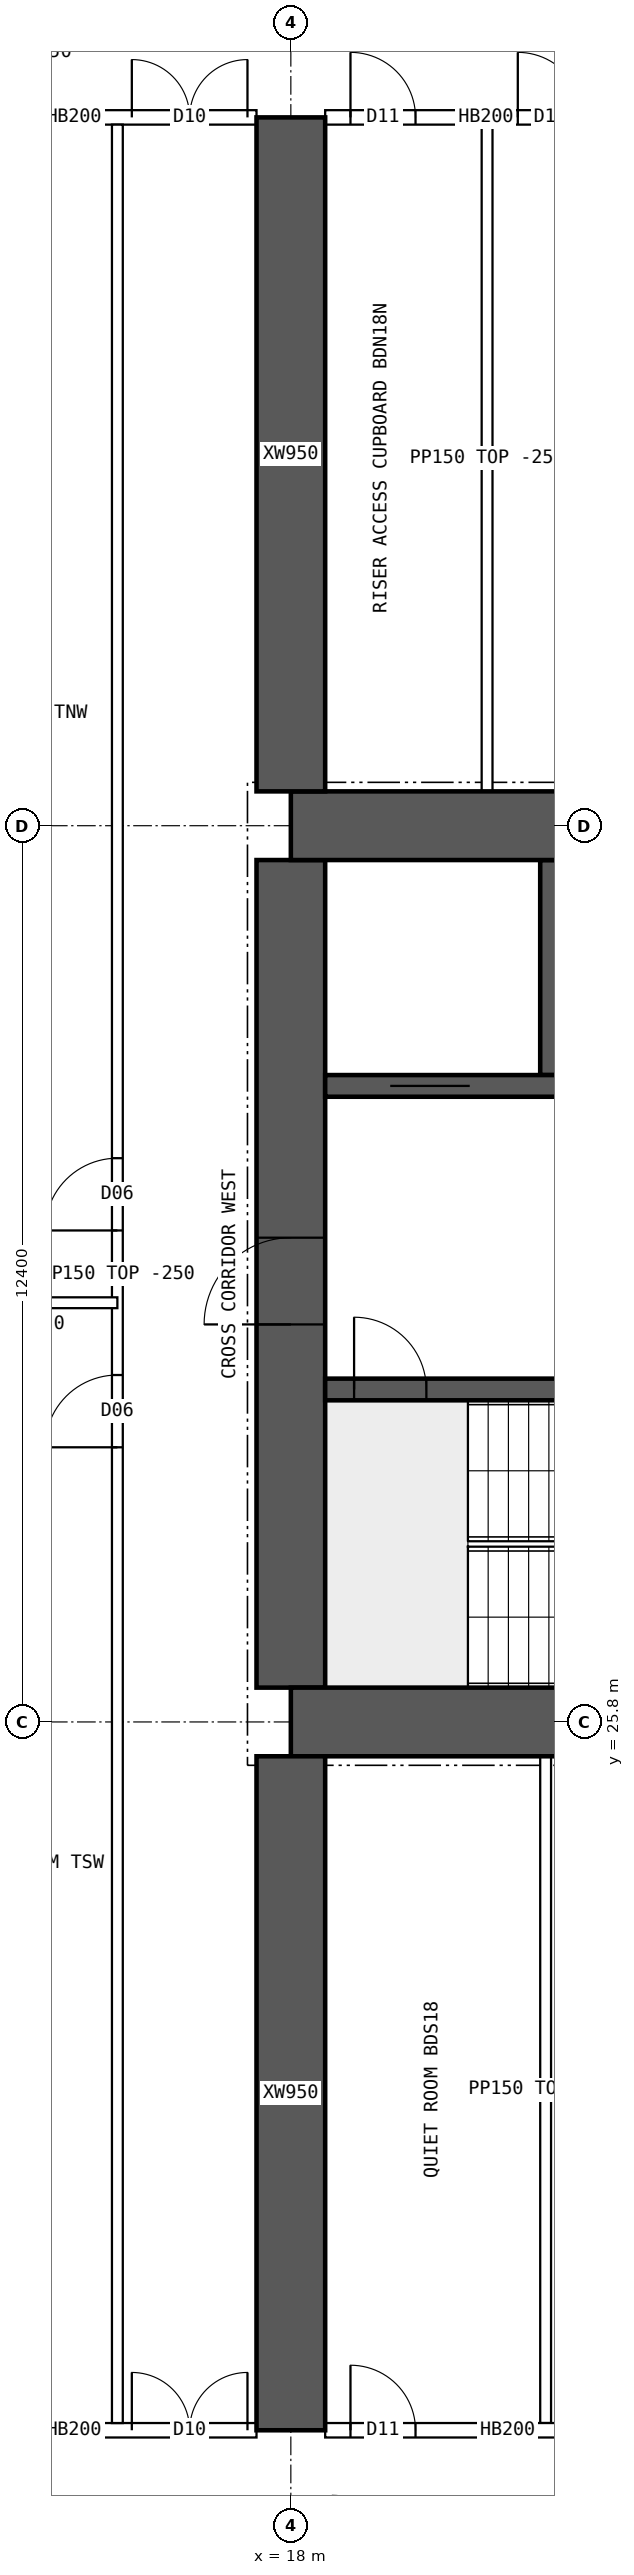
"""IFC4 building model, lengths in metres.
Left out: names, types, materials, properties, quantities, classifications, styles, units other than length and angle.
Written with IfcOpenShell. Run it as: python <this file> out.ifc"""

import sys

from ifc_helpers import new_model, si_unit, direction, frame, frame_2d, origin, place, context, subcontext, project, spatial, rectangle, extrude, element, fill, save


model = new_model("IFC4")
c1 = context("Model", 3, precision=1e-05, world=origin(), true_north=direction((0.0, 1.0)))
c2 = subcontext(c1, "Body", "Model", "MODEL_VIEW")
j1 = project(units=[si_unit("LENGTHUNIT", "METRE"), si_unit("PLANEANGLEUNIT", "RADIAN")], contexts=[c1])
p1 = place(None, origin())
s1 = spatial("IfcSite", under=j1, at=p1, CompositionType="ELEMENT")
p2 = place(p1, origin())
s2 = spatial("IfcBuilding", under=s1, at=p2, CompositionType="ELEMENT")
p3 = place(p2, frame((0.0, 0.0, 91.9)))
s3 = spatial("IfcBuildingStorey", under=s2, at=p3, CompositionType="ELEMENT", Elevation=91.9)
for number, where, z_axis, x_axis in (
    (1, (18.0, 25.8, 0.0), (0.0, 0.0, 1.0), (1.0, 0.0, 0.0)),
    (2, (18.0, 38.2, 0.0), (0.0, 0.0, 1.0), (1.0, 0.0, 0.0)),
):
    element("IfcWall", number, at=place(p3, frame(where, z_axis=z_axis, x_axis=x_axis)), inside=s3, PredefinedType="SHEAR", context=c2, shape_type="SweptSolid", body=[
        extrude(rectangle(XDim=48.0, YDim=0.95, at=frame_2d((24.0, 0.0))), origin(), (0.0, 0.0, 1.0), 3.75),
    ])
p4 = place(p3, frame((18.0, 26.275, 0.0), z_axis=(0.0, 0.0, 1.0), x_axis=(0.0, 1.0, 0.0)))
e3 = element("IfcWall", 3, at=p4, inside=s3, PredefinedType="SHEAR", context=c2, shape_type="SweptSolid", body=[
    extrude(rectangle(XDim=11.45, YDim=0.95, at=frame_2d((5.725, 0.0))), origin(), (0.0, 0.0, 1.0), 3.75),
])
p5 = place(p4, frame((5.025, 0.0, 0.0)))
e4 = element("IfcOpeningElement", 4, at=p5, cuts=e3, PredefinedType="OPENING", context=c2, shape_type="SweptSolid", body=[
    extrude(rectangle(XDim=1.2, YDim=2.1, at=frame_2d((0.6, 1.05))), frame((0.0, 0.485, 0.0), z_axis=(0.0, -1.0, 0.0), x_axis=(1.0, 0.0, 0.0)), (0.0, 0.0, 1.0), 0.97),
])
p6 = place(p3, frame((18.475, 30.4, 0.0), z_axis=(0.0, 0.0, 1.0), x_axis=(1.0, 0.0, 0.0)))
e5 = element("IfcWall", 5, at=p6, inside=s3, PredefinedType="SHEAR", context=c2, shape_type="SweptSolid", body=[
    extrude(rectangle(XDim=47.05, YDim=0.3, at=frame_2d((23.525, 0.0))), origin(), (0.0, 0.0, 1.0), 3.75),
])
p7 = place(p6, frame((0.4, 0.0, 0.0)))
e6 = element("IfcOpeningElement", 6, at=p7, cuts=e5, PredefinedType="OPENING", context=c2, shape_type="SweptSolid", body=[
    extrude(rectangle(XDim=1.0, YDim=2.1, at=frame_2d((0.5, 1.05))), frame((0.0, 0.16, 0.0), z_axis=(0.0, -1.0, 0.0), x_axis=(1.0, 0.0, 0.0)), (0.0, 0.0, 1.0), 0.32),
])
p8 = place(p6, frame((45.65, 0.0, 0.0)))
e7 = element("IfcOpeningElement", 7, at=p8, cuts=e5, PredefinedType="OPENING", context=c2, shape_type="SweptSolid", body=[
    extrude(rectangle(XDim=1.0, YDim=2.1, at=frame_2d((0.5, 1.05))), frame((0.0, 0.16, 0.0), z_axis=(0.0, -1.0, 0.0), x_axis=(1.0, 0.0, 0.0)), (0.0, 0.0, 1.0), 0.32),
])
p9 = place(p6, frame((8.275, 0.0, 0.0)))
e8 = element("IfcOpeningElement", 8, at=p9, cuts=e5, PredefinedType="OPENING", context=c2, shape_type="SweptSolid", body=[
    extrude(rectangle(XDim=1.1, YDim=2.1, at=frame_2d((0.55, 1.05))), frame((0.0, 0.16, 0.0), z_axis=(0.0, -1.0, 0.0), x_axis=(1.0, 0.0, 0.0)), (0.0, 0.0, 1.0), 0.32),
])
p10 = place(p6, frame((10.875, 0.0, 0.0)))
e9 = element("IfcOpeningElement", 9, at=p10, cuts=e5, PredefinedType="OPENING", context=c2, shape_type="SweptSolid", body=[
    extrude(rectangle(XDim=1.1, YDim=2.1, at=frame_2d((0.55, 1.05))), frame((0.0, 0.16, 0.0), z_axis=(0.0, -1.0, 0.0), x_axis=(1.0, 0.0, 0.0)), (0.0, 0.0, 1.0), 0.32),
])
p11 = place(p6, frame((13.475, 0.0, 0.0)))
e10 = element("IfcOpeningElement", 10, at=p11, cuts=e5, PredefinedType="OPENING", context=c2, shape_type="SweptSolid", body=[
    extrude(rectangle(XDim=1.1, YDim=2.1, at=frame_2d((0.55, 1.05))), frame((0.0, 0.16, 0.0), z_axis=(0.0, -1.0, 0.0), x_axis=(1.0, 0.0, 0.0)), (0.0, 0.0, 1.0), 0.32),
])
p12 = place(p6, frame((16.075, 0.0, 0.0)))
e11 = element("IfcOpeningElement", 11, at=p12, cuts=e5, PredefinedType="OPENING", context=c2, shape_type="SweptSolid", body=[
    extrude(rectangle(XDim=1.1, YDim=2.1, at=frame_2d((0.55, 1.05))), frame((0.0, 0.16, 0.0), z_axis=(0.0, -1.0, 0.0), x_axis=(1.0, 0.0, 0.0)), (0.0, 0.0, 1.0), 0.32),
])
p13 = place(p6, frame((18.85, 0.0, 0.0)))
e12 = element("IfcOpeningElement", 12, at=p13, cuts=e5, PredefinedType="OPENING", context=c2, shape_type="SweptSolid", body=[
    extrude(rectangle(XDim=0.9, YDim=2.1, at=frame_2d((0.45, 1.05))), frame((0.0, 0.16, 0.0), z_axis=(0.0, -1.0, 0.0), x_axis=(1.0, 0.0, 0.0)), (0.0, 0.0, 1.0), 0.32),
])
p14 = place(p6, frame((30.142, 0.0, 0.0)))
e13 = element("IfcOpeningElement", 13, at=p14, cuts=e5, PredefinedType="OPENING", context=c2, shape_type="SweptSolid", body=[
    extrude(rectangle(XDim=1.1, YDim=2.1, at=frame_2d((0.55, 1.05))), frame((0.0, 0.16, 0.0), z_axis=(0.0, -1.0, 0.0), x_axis=(1.0, 0.0, 0.0)), (0.0, 0.0, 1.0), 0.32),
])
p15 = place(p6, frame((33.675, 0.0, 0.0)))
e14 = element("IfcOpeningElement", 14, at=p15, cuts=e5, PredefinedType="OPENING", context=c2, shape_type="SweptSolid", body=[
    extrude(rectangle(XDim=1.1, YDim=2.1, at=frame_2d((0.55, 1.05))), frame((0.0, 0.16, 0.0), z_axis=(0.0, -1.0, 0.0), x_axis=(1.0, 0.0, 0.0)), (0.0, 0.0, 1.0), 0.32),
])
p16 = place(p6, frame((37.208, 0.0, 0.0)))
e15 = element("IfcOpeningElement", 15, at=p16, cuts=e5, PredefinedType="OPENING", context=c2, shape_type="SweptSolid", body=[
    extrude(rectangle(XDim=1.1, YDim=2.1, at=frame_2d((0.55, 1.05))), frame((0.0, 0.16, 0.0), z_axis=(0.0, -1.0, 0.0), x_axis=(1.0, 0.0, 0.0)), (0.0, 0.0, 1.0), 0.32),
])
p17 = place(p3, frame((18.475, 34.6, 0.0), z_axis=(0.0, 0.0, 1.0), x_axis=(1.0, 0.0, 0.0)))
e16 = element("IfcWall", 16, at=p17, inside=s3, PredefinedType="SHEAR", context=c2, shape_type="SweptSolid", body=[
    extrude(rectangle(XDim=47.05, YDim=0.3, at=frame_2d((23.525, 0.0))), origin(), (0.0, 0.0, 1.0), 3.75),
])
p18 = place(p17, frame((0.9, 0.0, 0.0)))
e17 = element("IfcOpeningElement", 17, at=p18, cuts=e16, PredefinedType="OPENING", context=c2, shape_type="SweptSolid", body=[
    extrude(rectangle(XDim=1.1, YDim=2.1, at=frame_2d((0.55, 1.05))), frame((0.0, 0.16, 0.0), z_axis=(0.0, -1.0, 0.0), x_axis=(1.0, 0.0, 0.0)), (0.0, 0.0, 1.0), 0.32),
])
p19 = place(p17, frame((45.05, 0.0, 0.0)))
e18 = element("IfcOpeningElement", 18, at=p19, cuts=e16, PredefinedType="OPENING", context=c2, shape_type="SweptSolid", body=[
    extrude(rectangle(XDim=1.1, YDim=2.1, at=frame_2d((0.55, 1.05))), frame((0.0, 0.16, 0.0), z_axis=(0.0, -1.0, 0.0), x_axis=(1.0, 0.0, 0.0)), (0.0, 0.0, 1.0), 0.32),
])
p20 = place(p17, frame((4.125, 0.0, 0.0)))
e19 = element("IfcOpeningElement", 19, at=p20, cuts=e16, PredefinedType="OPENING", context=c2, shape_type="SweptSolid", body=[
    extrude(rectangle(XDim=0.9, YDim=2.1, at=frame_2d((0.45, 1.05))), frame((0.0, 0.16, 0.0), z_axis=(0.0, -1.0, 0.0), x_axis=(1.0, 0.0, 0.0)), (0.0, 0.0, 1.0), 0.32),
])
p21 = place(p17, frame((42.025, 0.0, 0.0)))
e20 = element("IfcOpeningElement", 20, at=p21, cuts=e16, PredefinedType="OPENING", context=c2, shape_type="SweptSolid", body=[
    extrude(rectangle(XDim=0.9, YDim=2.1, at=frame_2d((0.45, 1.05))), frame((0.0, 0.16, 0.0), z_axis=(0.0, -1.0, 0.0), x_axis=(1.0, 0.0, 0.0)), (0.0, 0.0, 1.0), 0.32),
])
p22 = place(p17, frame((8.9, 0.0, 0.0)))
e21 = element("IfcOpeningElement", 21, at=p22, cuts=e16, PredefinedType="OPENING", context=c2, shape_type="SweptSolid", body=[
    extrude(rectangle(XDim=0.9, YDim=2.1, at=frame_2d((0.45, 1.05))), frame((0.0, 0.16, 0.0), z_axis=(0.0, -1.0, 0.0), x_axis=(1.0, 0.0, 0.0)), (0.0, 0.0, 1.0), 0.32),
])
p23 = place(p17, frame((12.874, 0.0, 0.0)))
e22 = element("IfcOpeningElement", 22, at=p23, cuts=e16, PredefinedType="OPENING", context=c2, shape_type="SweptSolid", body=[
    extrude(rectangle(XDim=0.9, YDim=2.1, at=frame_2d((0.45, 1.05))), frame((0.0, 0.16, 0.0), z_axis=(0.0, -1.0, 0.0), x_axis=(1.0, 0.0, 0.0)), (0.0, 0.0, 1.0), 0.32),
])
p24 = place(p17, frame((16.521, 0.0, 0.0)))
e23 = element("IfcOpeningElement", 23, at=p24, cuts=e16, PredefinedType="OPENING", context=c2, shape_type="SweptSolid", body=[
    extrude(rectangle(XDim=0.9, YDim=2.1, at=frame_2d((0.45, 1.05))), frame((0.0, 0.16, 0.0), z_axis=(0.0, -1.0, 0.0), x_axis=(1.0, 0.0, 0.0)), (0.0, 0.0, 1.0), 0.32),
])
p25 = place(p17, frame((20.28, 0.0, 0.0)))
e24 = element("IfcOpeningElement", 24, at=p25, cuts=e16, PredefinedType="OPENING", context=c2, shape_type="SweptSolid", body=[
    extrude(rectangle(XDim=0.9, YDim=2.1, at=frame_2d((0.45, 1.05))), frame((0.0, 0.16, 0.0), z_axis=(0.0, -1.0, 0.0), x_axis=(1.0, 0.0, 0.0)), (0.0, 0.0, 1.0), 0.32),
])
p26 = place(p17, frame((24.686, 0.0, 0.0)))
e25 = element("IfcOpeningElement", 25, at=p26, cuts=e16, PredefinedType="OPENING", context=c2, shape_type="SweptSolid", body=[
    extrude(rectangle(XDim=0.9, YDim=2.1, at=frame_2d((0.45, 1.05))), frame((0.0, 0.16, 0.0), z_axis=(0.0, -1.0, 0.0), x_axis=(1.0, 0.0, 0.0)), (0.0, 0.0, 1.0), 0.32),
])
p27 = place(p17, frame((27.483, 0.0, 0.0)))
e26 = element("IfcOpeningElement", 26, at=p27, cuts=e16, PredefinedType="OPENING", context=c2, shape_type="SweptSolid", body=[
    extrude(rectangle(XDim=0.9, YDim=2.1, at=frame_2d((0.45, 1.05))), frame((0.0, 0.16, 0.0), z_axis=(0.0, -1.0, 0.0), x_axis=(1.0, 0.0, 0.0)), (0.0, 0.0, 1.0), 0.32),
])
p28 = place(p17, frame((30.666, 0.0, 0.0)))
e27 = element("IfcOpeningElement", 27, at=p28, cuts=e16, PredefinedType="OPENING", context=c2, shape_type="SweptSolid", body=[
    extrude(rectangle(XDim=0.9, YDim=2.1, at=frame_2d((0.45, 1.05))), frame((0.0, 0.16, 0.0), z_axis=(0.0, -1.0, 0.0), x_axis=(1.0, 0.0, 0.0)), (0.0, 0.0, 1.0), 0.32),
])
p29 = place(p17, frame((34.617, 0.0, 0.0)))
e28 = element("IfcOpeningElement", 28, at=p29, cuts=e16, PredefinedType="OPENING", context=c2, shape_type="SweptSolid", body=[
    extrude(rectangle(XDim=0.9, YDim=2.1, at=frame_2d((0.45, 1.05))), frame((0.0, 0.16, 0.0), z_axis=(0.0, -1.0, 0.0), x_axis=(1.0, 0.0, 0.0)), (0.0, 0.0, 1.0), 0.32),
])
p30 = place(p17, frame((37.555, 0.0, 0.0)))
e29 = element("IfcOpeningElement", 29, at=p30, cuts=e16, PredefinedType="OPENING", context=c2, shape_type="SweptSolid", body=[
    extrude(rectangle(XDim=0.9, YDim=2.1, at=frame_2d((0.45, 1.05))), frame((0.0, 0.16, 0.0), z_axis=(0.0, -1.0, 0.0), x_axis=(1.0, 0.0, 0.0)), (0.0, 0.0, 1.0), 0.32),
])
p31 = place(p3, frame((21.6, 34.75, 0.0), z_axis=(0.0, 0.0, 1.0), x_axis=(0.0, 1.0, 0.0)))
e30 = element("IfcWall", 30, at=p31, inside=s3, PredefinedType="SHEAR", context=c2, shape_type="SweptSolid", body=[
    extrude(rectangle(XDim=2.975, YDim=0.3, at=frame_2d((1.488, 0.0))), origin(), (0.0, 0.0, 1.0), 3.75),
])
for number, where, z_axis, x_axis in (
    (31, (18.0, 16.0, 0.0), (0.0, 0.0, 1.0), (0.0, 1.0, 0.0)),
    (32, (18.0, 38.675, 0.0), (0.0, 0.0, 1.0), (0.0, 1.0, 0.0)),
):
    element("IfcWall", number, at=place(p3, frame(where, z_axis=z_axis, x_axis=x_axis)), inside=s3, PredefinedType="SHEAR", context=c2, shape_type="SweptSolid", body=[
        extrude(rectangle(XDim=9.325, YDim=0.95, at=frame_2d((4.663, 0.0))), origin(), (0.0, 0.0, 1.0), 3.75),
    ])
p32 = place(p3, frame((12.475, 16.0, 0.0), z_axis=(0.0, 0.0, 1.0), x_axis=(1.0, 0.0, 0.0)))
e33 = element("IfcWall", 33, at=p32, inside=s3, PredefinedType="SOLIDWALL", context=c2, shape_type="SweptSolid", body=[
    extrude(rectangle(XDim=5.05, YDim=0.2, at=frame_2d((2.525, 0.0))), origin(), (0.0, 0.0, 1.0), 3.5),
])
p33 = place(p32, frame((3.325, 0.0, 0.0)))
e34 = element("IfcOpeningElement", 34, at=p33, cuts=e33, PredefinedType="OPENING", context=c2, shape_type="SweptSolid", body=[
    extrude(rectangle(XDim=1.6, YDim=2.1, at=frame_2d((0.8, 1.05))), frame((0.0, 0.11, 0.0), z_axis=(0.0, -1.0, 0.0), x_axis=(1.0, 0.0, 0.0)), (0.0, 0.0, 1.0), 0.22),
])
p34 = place(p3, frame((18.475, 16.0, 0.0), z_axis=(0.0, 0.0, 1.0), x_axis=(1.0, 0.0, 0.0)))
e35 = element("IfcWall", 35, at=p34, inside=s3, PredefinedType="SOLIDWALL", context=c2, shape_type="SweptSolid", body=[
    extrude(rectangle(XDim=5.05, YDim=0.2, at=frame_2d((2.525, 0.0))), origin(), (0.0, 0.0, 1.0), 3.5),
])
p35 = place(p34, frame((0.35, 0.0, 0.0)))
e36 = element("IfcOpeningElement", 36, at=p35, cuts=e35, PredefinedType="OPENING", context=c2, shape_type="SweptSolid", body=[
    extrude(rectangle(XDim=0.9, YDim=2.1, at=frame_2d((0.45, 1.05))), frame((0.0, 0.11, 0.0), z_axis=(0.0, -1.0, 0.0), x_axis=(1.0, 0.0, 0.0)), (0.0, 0.0, 1.0), 0.22),
])
p36 = place(p34, frame((3.475, 0.0, 0.0)))
e37 = element("IfcOpeningElement", 37, at=p36, cuts=e35, PredefinedType="OPENING", context=c2, shape_type="SweptSolid", body=[
    extrude(rectangle(XDim=0.9, YDim=2.1, at=frame_2d((0.45, 1.05))), frame((0.0, 0.11, 0.0), z_axis=(0.0, -1.0, 0.0), x_axis=(1.0, 0.0, 0.0)), (0.0, 0.0, 1.0), 0.22),
])
p37 = place(p3, frame((12.475, 48.0, 0.0), z_axis=(0.0, 0.0, 1.0), x_axis=(1.0, 0.0, 0.0)))
e38 = element("IfcWall", 38, at=p37, inside=s3, PredefinedType="SOLIDWALL", context=c2, shape_type="SweptSolid", body=[
    extrude(rectangle(XDim=5.05, YDim=0.2, at=frame_2d((2.525, 0.0))), origin(), (0.0, 0.0, 1.0), 3.5),
])
p38 = place(p37, frame((3.325, 0.0, 0.0)))
e39 = element("IfcOpeningElement", 39, at=p38, cuts=e38, PredefinedType="OPENING", context=c2, shape_type="SweptSolid", body=[
    extrude(rectangle(XDim=1.6, YDim=2.1, at=frame_2d((0.8, 1.05))), frame((0.0, 0.11, 0.0), z_axis=(0.0, -1.0, 0.0), x_axis=(1.0, 0.0, 0.0)), (0.0, 0.0, 1.0), 0.22),
])
p39 = place(p3, frame((18.475, 48.0, 0.0), z_axis=(0.0, 0.0, 1.0), x_axis=(1.0, 0.0, 0.0)))
e40 = element("IfcWall", 40, at=p39, inside=s3, PredefinedType="SOLIDWALL", context=c2, shape_type="SweptSolid", body=[
    extrude(rectangle(XDim=5.05, YDim=0.2, at=frame_2d((2.525, 0.0))), origin(), (0.0, 0.0, 1.0), 3.5),
])
p40 = place(p39, frame((0.35, 0.0, 0.0)))
e41 = element("IfcOpeningElement", 41, at=p40, cuts=e40, PredefinedType="OPENING", context=c2, shape_type="SweptSolid", body=[
    extrude(rectangle(XDim=0.9, YDim=2.1, at=frame_2d((0.45, 1.05))), frame((0.0, 0.11, 0.0), z_axis=(0.0, -1.0, 0.0), x_axis=(1.0, 0.0, 0.0)), (0.0, 0.0, 1.0), 0.22),
])
p41 = place(p39, frame((2.665, 0.0, 0.0)))
e42 = element("IfcOpeningElement", 42, at=p41, cuts=e40, PredefinedType="OPENING", context=c2, shape_type="SweptSolid", body=[
    extrude(rectangle(XDim=0.9, YDim=2.1, at=frame_2d((0.45, 1.05))), frame((0.0, 0.11, 0.0), z_axis=(0.0, -1.0, 0.0), x_axis=(1.0, 0.0, 0.0)), (0.0, 0.0, 1.0), 0.22),
])
for number, where, z_axis, x_axis in (
    (43, (21.525, 16.1, 0.0), (0.0, 0.0, 1.0), (0.0, 1.0, 0.0)),
    (44, (20.715, 38.675, 0.0), (0.0, 0.0, 1.0), (0.0, 1.0, 0.0)),
):
    element("IfcWall", number, at=place(p3, frame(where, z_axis=z_axis, x_axis=x_axis)), inside=s3, PredefinedType="PARTITIONING", context=c2, shape_type="SweptSolid", body=[
        extrude(rectangle(XDim=9.225, YDim=0.15, at=frame_2d((4.612, 0.0))), origin(), (0.0, 0.0, 1.0), 3.5),
    ])
p42 = place(p3, frame((15.6, 16.1, 0.0), z_axis=(0.0, 0.0, 1.0), x_axis=(0.0, 1.0, 0.0)))
e45 = element("IfcWall", 45, at=p42, inside=s3, PredefinedType="PARTITIONING", context=c2, shape_type="SweptSolid", body=[
    extrude(rectangle(XDim=31.8, YDim=0.15, at=frame_2d((15.9, 0.0))), origin(), (0.0, 0.0, 1.0), 3.5),
])
p43 = place(p42, frame((13.5, 0.0, 0.0)))
e46 = element("IfcOpeningElement", 46, at=p43, cuts=e45, PredefinedType="OPENING", context=c2, shape_type="SweptSolid", body=[
    extrude(rectangle(XDim=1.0, YDim=2.1, at=frame_2d((0.5, 1.05))), frame((0.0, 0.085, 0.0), z_axis=(0.0, -1.0, 0.0), x_axis=(1.0, 0.0, 0.0)), (0.0, 0.0, 1.0), 0.17),
])
p44 = place(p42, frame((16.5, 0.0, 0.0)))
e47 = element("IfcOpeningElement", 47, at=p44, cuts=e45, PredefinedType="OPENING", context=c2, shape_type="SweptSolid", body=[
    extrude(rectangle(XDim=1.0, YDim=2.1, at=frame_2d((0.5, 1.05))), frame((0.0, 0.085, 0.0), z_axis=(0.0, -1.0, 0.0), x_axis=(1.0, 0.0, 0.0)), (0.0, 0.0, 1.0), 0.17),
])
p45 = place(p3, frame((12.0, 31.6, 0.0), z_axis=(0.0, 0.0, 1.0), x_axis=(1.0, 0.0, 0.0)))
e48 = element("IfcWall", 48, at=p45, inside=s3, PredefinedType="PARTITIONING", context=c2, shape_type="SweptSolid", body=[
    extrude(rectangle(XDim=3.6, YDim=0.15, at=frame_2d((1.8, 0.0))), origin(), (0.0, 0.0, 1.0), 3.5),
])
p46 = place(p5, origin())
e49 = element("IfcDoor", 49, at=p46, inside=s3, OperationType="SINGLE_SWING_LEFT", PredefinedType="DOOR", context=c2, shape_type="SweptSolid", body=[
    extrude(rectangle(XDim=1.2, YDim=2.1, at=frame_2d((0.6, 1.05))), frame((0.0, 0.025, 0.0), z_axis=(0.0, -1.0, 0.0), x_axis=(1.0, 0.0, 0.0)), (0.0, 0.0, 1.0), 0.05),
])
fill(e4, e49)
p47 = place(p7, origin())
e50 = element("IfcDoor", 50, at=p47, inside=s3, OperationType="SINGLE_SWING_LEFT", PredefinedType="DOOR", context=c2, shape_type="SweptSolid", body=[
    extrude(rectangle(XDim=1.0, YDim=2.1, at=frame_2d((0.5, 1.05))), frame((0.0, 0.025, 0.0), z_axis=(0.0, -1.0, 0.0), x_axis=(1.0, 0.0, 0.0)), (0.0, 0.0, 1.0), 0.05),
])
fill(e6, e50)
p48 = place(p18, origin())
e51 = element("IfcDoor", 51, at=p48, inside=s3, OperationType="DOUBLE_DOOR_SLIDING", PredefinedType="DOOR", context=c2, shape_type="SweptSolid", body=[
    extrude(rectangle(XDim=1.1, YDim=2.1, at=frame_2d((0.55, 1.05))), frame((0.0, 0.025, 0.0), z_axis=(0.0, -1.0, 0.0), x_axis=(1.0, 0.0, 0.0)), (0.0, 0.0, 1.0), 0.05),
])
fill(e17, e51)
p49 = place(p33, origin())
e52 = element("IfcDoor", 52, at=p49, inside=s3, OperationType="DOUBLE_DOOR_SINGLE_SWING", PredefinedType="DOOR", context=c2, shape_type="SweptSolid", body=[
    extrude(rectangle(XDim=1.6, YDim=2.1, at=frame_2d((0.8, 1.05))), frame((0.0, 0.025, 0.0), z_axis=(0.0, -1.0, 0.0), x_axis=(1.0, 0.0, 0.0)), (0.0, 0.0, 1.0), 0.05),
])
fill(e34, e52)
p50 = place(p38, origin())
e53 = element("IfcDoor", 53, at=p50, inside=s3, OperationType="DOUBLE_DOOR_SINGLE_SWING", PredefinedType="DOOR", context=c2, shape_type="SweptSolid", body=[
    extrude(rectangle(XDim=1.6, YDim=2.1, at=frame_2d((0.8, 1.05))), frame((0.0, 0.025, 0.0), z_axis=(0.0, -1.0, 0.0), x_axis=(1.0, 0.0, 0.0)), (0.0, 0.0, 1.0), 0.05),
])
fill(e39, e53)
p51 = place(p35, origin())
e54 = element("IfcDoor", 54, at=p51, inside=s3, OperationType="SINGLE_SWING_LEFT", PredefinedType="DOOR", context=c2, shape_type="SweptSolid", body=[
    extrude(rectangle(XDim=0.9, YDim=2.1, at=frame_2d((0.45, 1.05))), frame((0.0, 0.025, 0.0), z_axis=(0.0, -1.0, 0.0), x_axis=(1.0, 0.0, 0.0)), (0.0, 0.0, 1.0), 0.05),
])
fill(e36, e54)
p52 = place(p40, origin())
e55 = element("IfcDoor", 55, at=p52, inside=s3, OperationType="SINGLE_SWING_LEFT", PredefinedType="DOOR", context=c2, shape_type="SweptSolid", body=[
    extrude(rectangle(XDim=0.9, YDim=2.1, at=frame_2d((0.45, 1.05))), frame((0.0, 0.025, 0.0), z_axis=(0.0, -1.0, 0.0), x_axis=(1.0, 0.0, 0.0)), (0.0, 0.0, 1.0), 0.05),
])
fill(e41, e55)
p53 = place(p41, origin())
e56 = element("IfcDoor", 56, at=p53, inside=s3, OperationType="SINGLE_SWING_LEFT", PredefinedType="DOOR", context=c2, shape_type="SweptSolid", body=[
    extrude(rectangle(XDim=0.9, YDim=2.1, at=frame_2d((0.45, 1.05))), frame((0.0, 0.025, 0.0), z_axis=(0.0, -1.0, 0.0), x_axis=(1.0, 0.0, 0.0)), (0.0, 0.0, 1.0), 0.05),
])
fill(e42, e56)
p54 = place(p43, origin())
e57 = element("IfcDoor", 57, at=p54, inside=s3, OperationType="SINGLE_SWING_LEFT", PredefinedType="DOOR", context=c2, shape_type="SweptSolid", body=[
    extrude(rectangle(XDim=1.0, YDim=2.1, at=frame_2d((0.5, 1.05))), frame((0.0, 0.025, 0.0), z_axis=(0.0, -1.0, 0.0), x_axis=(1.0, 0.0, 0.0)), (0.0, 0.0, 1.0), 0.05),
])
fill(e46, e57)
p55 = place(p44, origin())
e58 = element("IfcDoor", 58, at=p55, inside=s3, OperationType="SINGLE_SWING_LEFT", PredefinedType="DOOR", context=c2, shape_type="SweptSolid", body=[
    extrude(rectangle(XDim=1.0, YDim=2.1, at=frame_2d((0.5, 1.05))), frame((0.0, 0.025, 0.0), z_axis=(0.0, -1.0, 0.0), x_axis=(1.0, 0.0, 0.0)), (0.0, 0.0, 1.0), 0.05),
])
fill(e47, e58)
save(model, sys.argv[1])
